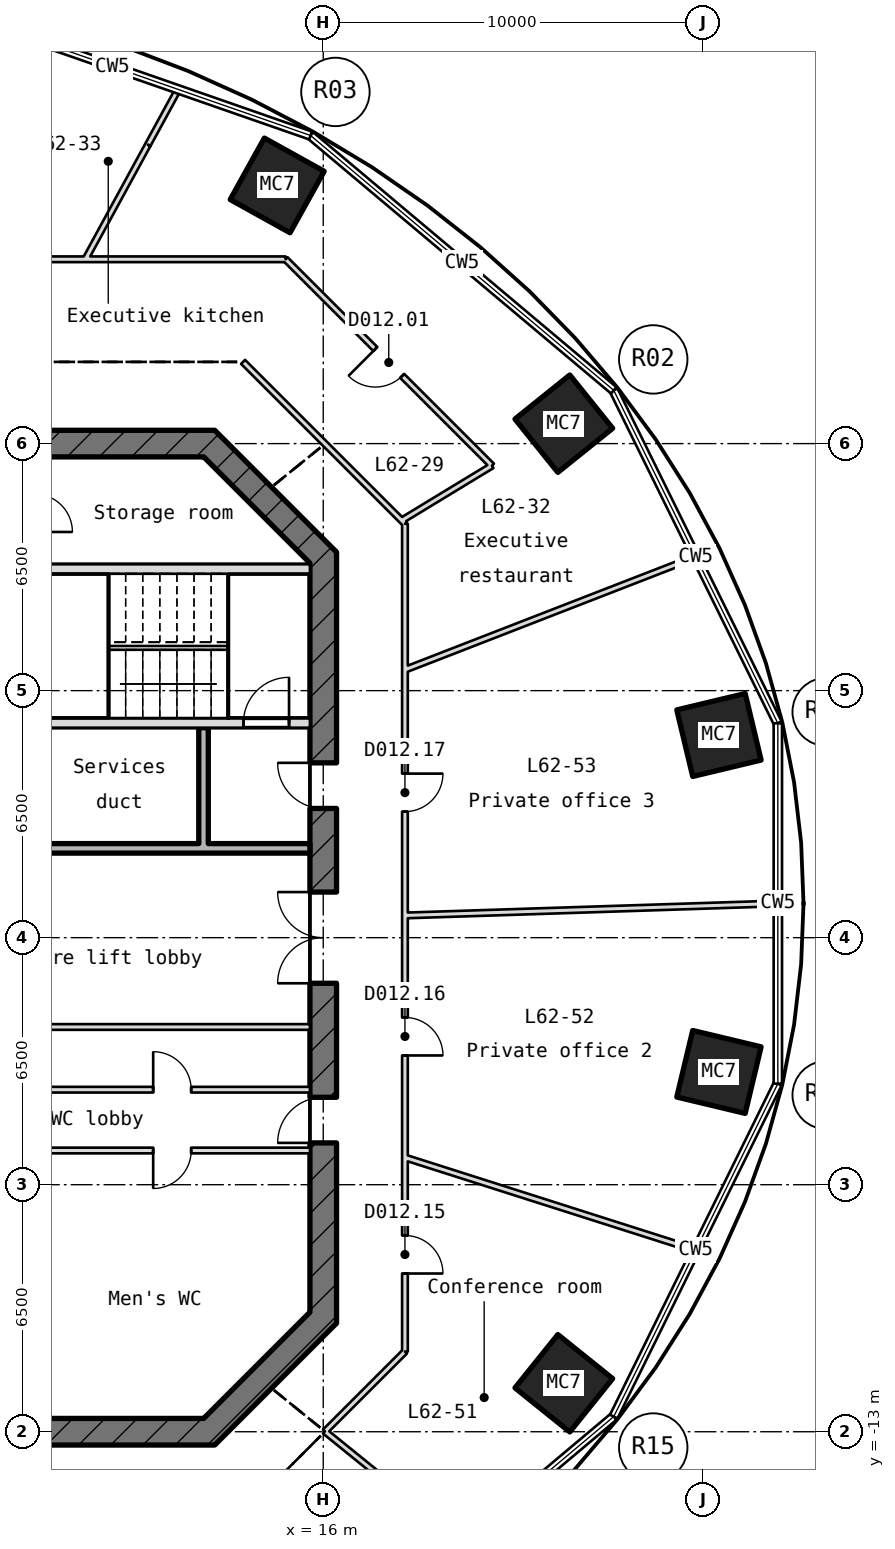
"""IFC4 building model, lengths in metres.
Left out: names, types, materials, properties, quantities, classifications, styles, units other than length and angle.
Written with IfcOpenShell. Run it as: python <this file> out.ifc"""

import sys

from ifc_helpers import new_model, si_unit, direction, frame, frame_2d, origin, origin_2d, place, context, subcontext, project, spatial, rectangle, hollow_rectangle, extrude, element, fill, save


model = new_model("IFC4")
c1 = context("Model", 3, precision=1e-05, world=origin(), true_north=direction((0.0, 1.0)))
c2 = subcontext(c1, "Body", "Model", "MODEL_VIEW")
j1 = project(units=[si_unit("LENGTHUNIT", "METRE"), si_unit("PLANEANGLEUNIT", "RADIAN")], contexts=[c1])
p1 = place(None, origin())
s1 = spatial("IfcSite", under=j1, at=p1, CompositionType="ELEMENT")
p2 = place(p1, origin())
s2 = spatial("IfcBuilding", under=s1, at=p2, CompositionType="ELEMENT")
p3 = place(p2, frame((0.0, 0.0, 279.1)))
s3 = spatial("IfcBuildingStorey", under=s2, at=p3, CompositionType="ELEMENT", Elevation=279.1)
for number, where, z_axis, x_axis in (
    (1, (26.413, 5.333, -0.25), (0.0, 0.0, 1.0), (0.233, -0.973, 0.0)),
    (2, (22.331, 13.524, -0.25), (0.0, 0.0, 1.0), (0.627, -0.779, 0.0)),
    (3, (14.788, 19.793, -0.25), (0.0, 0.0, 1.0), (0.874, -0.486, 0.0)),
    (4, (22.331, -11.724, -0.25), (0.0, 0.0, 1.0), (-0.627, -0.779, 0.0)),
    (5, (26.413, -3.533, -0.25), (0.0, 0.0, 1.0), (-0.233, -0.973, 0.0)),
):
    element("IfcColumn", number, at=place(p3, frame(where, z_axis=z_axis, x_axis=x_axis)), inside=s3, PredefinedType="COLUMN", context=c2, shape_type="SweptSolid", body=[
        extrude(hollow_rectangle(XDim=1.8, YDim=1.85, WallThickness=0.06, at=origin_2d()), origin(), (0.0, 0.0, 1.0), 5.47),
    ])
p4 = place(p3, frame((12.897, -13.103, -0.25), z_axis=(0.0, 0.0, 1.0), x_axis=(0.707106781187, 0.707106781187, 0.0)))
e6 = element("IfcWall", 6, at=p4, inside=s3, PredefinedType="SHEAR", context=c2, shape_type="SweptSolid", body=[
    extrude(rectangle(XDim=4.533, YDim=0.7, at=frame_2d((2.266, 0.0))), origin(), (0.0, 0.0, 1.0), 5.47),
])
p5 = place(p3, frame((16.0, -10.145, -0.25), z_axis=(0.0, 0.0, 1.0), x_axis=(0.0, 1.0, 0.0)))
e7 = element("IfcWall", 7, at=p5, inside=s3, PredefinedType="SHEAR", context=c2, shape_type="SweptSolid", body=[
    extrude(rectangle(XDim=20.29, YDim=0.7, at=frame_2d((10.145, 0.0))), origin(), (0.0, 0.0, 1.0), 5.47),
])
p6 = place(p5, frame((8.945, 0.0, 0.25)))
e8 = element("IfcOpeningElement", 8, at=p6, cuts=e7, PredefinedType="OPENING", context=c2, shape_type="SweptSolid", body=[
    extrude(rectangle(XDim=2.4, YDim=2.1, at=frame_2d((1.2, 1.05))), frame((0.0, 0.36, 0.0), z_axis=(0.0, -1.0, 0.0), x_axis=(1.0, 0.0, 0.0)), (0.0, 0.0, 1.0), 0.72),
])
p7 = place(p5, frame((13.545, 0.0, 0.25)))
e9 = element("IfcOpeningElement", 9, at=p7, cuts=e7, PredefinedType="OPENING", context=c2, shape_type="SweptSolid", body=[
    extrude(rectangle(XDim=1.2, YDim=2.1, at=frame_2d((0.6, 1.05))), frame((0.0, 0.36, 0.0), z_axis=(0.0, -1.0, 0.0), x_axis=(1.0, 0.0, 0.0)), (0.0, 0.0, 1.0), 0.72),
])
p8 = place(p5, frame((4.745, 0.0, 0.25)))
e10 = element("IfcOpeningElement", 10, at=p8, cuts=e7, PredefinedType="OPENING", context=c2, shape_type="SweptSolid", body=[
    extrude(rectangle(XDim=1.2, YDim=2.1, at=frame_2d((0.6, 1.05))), frame((0.0, 0.36, 0.0), z_axis=(0.0, -1.0, 0.0), x_axis=(1.0, 0.0, 0.0)), (0.0, 0.0, 1.0), 0.72),
])
p9 = place(p3, frame((16.103, 9.897, -0.25), z_axis=(0.0, 0.0, 1.0), x_axis=(-0.707106781187, 0.707106781187, 0.0)))
e11 = element("IfcWall", 11, at=p9, inside=s3, PredefinedType="SHEAR", context=c2, shape_type="SweptSolid", body=[
    extrude(rectangle(XDim=4.533, YDim=0.7, at=frame_2d((2.266, 0.0))), origin(), (0.0, 0.0, 1.0), 5.47),
])
p10 = place(p3, frame((13.145, 13.0, -0.25), z_axis=(0.0, 0.0, 1.0), x_axis=(-1.0, 0.0, 0.0)))
e12 = element("IfcWall", 12, at=p10, inside=s3, PredefinedType="SHEAR", context=c2, shape_type="SweptSolid", body=[
    extrude(rectangle(XDim=26.29, YDim=0.7, at=frame_2d((13.145, 0.0))), origin(), (0.0, 0.0, 1.0), 5.47),
])
p11 = place(p10, frame((11.945, 0.0, 0.25)))
e13 = element("IfcOpeningElement", 13, at=p11, cuts=e12, PredefinedType="OPENING", context=c2, shape_type="SweptSolid", body=[
    extrude(rectangle(XDim=2.4, YDim=2.1, at=frame_2d((1.2, 1.05))), frame((0.0, 0.36, 0.0), z_axis=(0.0, -1.0, 0.0), x_axis=(1.0, 0.0, 0.0)), (0.0, 0.0, 1.0), 0.72),
])
p12 = place(p3, frame((-13.145, -13.0, -0.25), z_axis=(0.0, 0.0, 1.0), x_axis=(1.0, 0.0, 0.0)))
e14 = element("IfcWall", 14, at=p12, inside=s3, PredefinedType="SHEAR", context=c2, shape_type="SweptSolid", body=[
    extrude(rectangle(XDim=26.29, YDim=0.7, at=frame_2d((13.145, 0.0))), origin(), (0.0, 0.0, 1.0), 5.47),
])
p13 = place(p12, frame((2.845, 0.0, 0.25)))
e15 = element("IfcOpeningElement", 15, at=p13, cuts=e14, PredefinedType="OPENING", context=c2, shape_type="SweptSolid", body=[
    extrude(rectangle(XDim=1.2, YDim=2.1, at=frame_2d((0.6, 1.05))), frame((0.0, 0.36, 0.0), z_axis=(0.0, -1.0, 0.0), x_axis=(1.0, 0.0, 0.0)), (0.0, 0.0, 1.0), 0.72),
])
p14 = place(p12, frame((6.845, 0.0, 0.25)))
e16 = element("IfcOpeningElement", 16, at=p14, cuts=e14, PredefinedType="OPENING", context=c2, shape_type="SweptSolid", body=[
    extrude(rectangle(XDim=1.4, YDim=2.1, at=frame_2d((0.7, 1.05))), frame((0.0, 0.36, 0.0), z_axis=(0.0, -1.0, 0.0), x_axis=(1.0, 0.0, 0.0)), (0.0, 0.0, 1.0), 0.72),
])
p15 = place(p12, frame((15.445, 0.0, 0.25)))
e17 = element("IfcOpeningElement", 17, at=p15, cuts=e14, PredefinedType="OPENING", context=c2, shape_type="SweptSolid", body=[
    extrude(rectangle(XDim=1.4, YDim=2.1, at=frame_2d((0.7, 1.05))), frame((0.0, 0.36, 0.0), z_axis=(0.0, -1.0, 0.0), x_axis=(1.0, 0.0, 0.0)), (0.0, 0.0, 1.0), 0.72),
])
p16 = place(p3, frame((8.55, -5.6, 0.0), z_axis=(0.0, 0.0, 1.0), x_axis=(1.0, 0.0, 0.0)))
e18 = element("IfcWall", 18, at=p16, inside=s3, PredefinedType="PARTITIONING", context=c2, shape_type="SweptSolid", body=[
    extrude(rectangle(XDim=7.1, YDim=0.15, at=frame_2d((3.55, 0.0))), origin(), (0.0, 0.0, 1.0), 5.22),
])
p17 = place(p16, frame((2.975, 0.0, 0.0)))
e19 = element("IfcOpeningElement", 19, at=p17, cuts=e18, PredefinedType="OPENING", context=c2, shape_type="SweptSolid", body=[
    extrude(rectangle(XDim=1.0, YDim=2.1, at=frame_2d((0.5, 1.05))), frame((0.0, 0.085, 0.0), z_axis=(0.0, -1.0, 0.0), x_axis=(1.0, 0.0, 0.0)), (0.0, 0.0, 1.0), 0.17),
])
p18 = place(p3, frame((8.55, -4.0, 0.0), z_axis=(0.0, 0.0, 1.0), x_axis=(1.0, 0.0, 0.0)))
e20 = element("IfcWall", 20, at=p18, inside=s3, PredefinedType="PARTITIONING", context=c2, shape_type="SweptSolid", body=[
    extrude(rectangle(XDim=7.1, YDim=0.15, at=frame_2d((3.55, 0.0))), origin(), (0.0, 0.0, 1.0), 5.22),
])
p19 = place(p18, frame((2.975, 0.0, 0.0)))
e21 = element("IfcOpeningElement", 21, at=p19, cuts=e20, PredefinedType="OPENING", context=c2, shape_type="SweptSolid", body=[
    extrude(rectangle(XDim=1.0, YDim=2.1, at=frame_2d((0.5, 1.05))), frame((0.0, 0.085, 0.0), z_axis=(0.0, -1.0, 0.0), x_axis=(1.0, 0.0, 0.0)), (0.0, 0.0, 1.0), 0.17),
])
p20 = place(p3, frame((8.4, -2.35, 0.0), z_axis=(0.0, 0.0, 1.0), x_axis=(1.0, 0.0, 0.0)))
e22 = element("IfcWall", 22, at=p20, inside=s3, PredefinedType="PARTITIONING", context=c2, shape_type="SweptSolid", body=[
    extrude(rectangle(XDim=7.25, YDim=0.15, at=frame_2d((3.625, 0.0))), origin(), (0.0, 0.0, 1.0), 5.22),
])
p21 = place(p3, frame((8.4, 2.35, 0.0), z_axis=(0.0, 0.0, 1.0), x_axis=(1.0, 0.0, 0.0)))
e23 = element("IfcWall", 23, at=p21, inside=s3, PredefinedType="STANDARD", context=c2, shape_type="SweptSolid", body=[
    extrude(rectangle(XDim=7.25, YDim=0.25, at=frame_2d((3.625, 0.0))), origin(), (0.0, 0.0, 1.0), 5.22),
])
p22 = place(p3, frame((8.55, 5.65, -0.25), z_axis=(0.0, 0.0, 1.0), x_axis=(1.0, 0.0, 0.0)))
e24 = element("IfcWall", 24, at=p22, inside=s3, PredefinedType="SHEAR", context=c2, shape_type="SweptSolid", body=[
    extrude(rectangle(XDim=7.1, YDim=0.25, at=frame_2d((3.55, 0.0))), origin(), (0.0, 0.0, 1.0), 5.47),
])
p23 = place(p22, frame((5.35, 0.0, 0.25)))
e25 = element("IfcOpeningElement", 25, at=p23, cuts=e24, PredefinedType="OPENING", context=c2, shape_type="SweptSolid", body=[
    extrude(rectangle(XDim=1.2, YDim=2.1, at=frame_2d((0.6, 1.05))), frame((0.0, 0.135, 0.0), z_axis=(0.0, -1.0, 0.0), x_axis=(1.0, 0.0, 0.0)), (0.0, 0.0, 1.0), 0.27),
])
p24 = place(p3, frame((8.55, 9.7, -0.25), z_axis=(0.0, 0.0, 1.0), x_axis=(1.0, 0.0, 0.0)))
e26 = element("IfcWall", 26, at=p24, inside=s3, PredefinedType="SHEAR", context=c2, shape_type="SweptSolid", body=[
    extrude(rectangle(XDim=7.1, YDim=0.25, at=frame_2d((3.55, 0.0))), origin(), (0.0, 0.0, 1.0), 5.47),
])
p25 = place(p3, frame((12.85, 2.475, 0.0), z_axis=(0.0, 0.0, 1.0), x_axis=(0.0, 1.0, 0.0)))
e27 = element("IfcWall", 27, at=p25, inside=s3, PredefinedType="STANDARD", context=c2, shape_type="SweptSolid", body=[
    extrude(rectangle(XDim=3.05, YDim=0.25, at=frame_2d((1.525, 0.0))), origin(), (0.0, 0.0, 1.0), 5.22),
])
p26 = place(p3, frame((-15.009, 17.85, 0.0), z_axis=(0.0, 0.0, 1.0), x_axis=(1.0, 0.0, 0.0)))
e28 = element("IfcWall", 28, at=p26, inside=s3, PredefinedType="PARTITIONING", context=c2, shape_type="SweptSolid", body=[
    extrude(rectangle(XDim=30.018, YDim=0.15, at=frame_2d((15.009, 0.0))), origin(), (0.0, 0.0, 1.0), 5.22),
])
p27 = place(p26, frame((21.282, 0.0, 0.0)))
e29 = element("IfcOpeningElement", 29, at=p27, cuts=e28, PredefinedType="OPENING", context=c2, shape_type="SweptSolid", body=[
    extrude(rectangle(XDim=1.0, YDim=2.1, at=frame_2d((0.5, 1.05))), frame((0.0, 0.085, 0.0), z_axis=(0.0, -1.0, 0.0), x_axis=(1.0, 0.0, 0.0)), (0.0, 0.0, 1.0), 0.17),
])
p28 = place(p26, frame((15.592, 0.0, 0.0)))
e30 = element("IfcOpeningElement", 30, at=p28, cuts=e28, PredefinedType="OPENING", context=c2, shape_type="SweptSolid", body=[
    extrude(rectangle(XDim=1.0, YDim=2.1, at=frame_2d((0.5, 1.05))), frame((0.0, 0.085, 0.0), z_axis=(0.0, -1.0, 0.0), x_axis=(1.0, 0.0, 0.0)), (0.0, 0.0, 1.0), 0.17),
])
p29 = place(p26, frame((10.075, 0.0, 0.0)))
e31 = element("IfcOpeningElement", 31, at=p29, cuts=e28, PredefinedType="OPENING", context=c2, shape_type="SweptSolid", body=[
    extrude(rectangle(XDim=1.0, YDim=2.1, at=frame_2d((0.5, 1.05))), frame((0.0, 0.085, 0.0), z_axis=(0.0, -1.0, 0.0), x_axis=(1.0, 0.0, 0.0)), (0.0, 0.0, 1.0), 0.17),
])
p30 = place(p26, frame((5.704, 0.0, 0.0)))
e32 = element("IfcOpeningElement", 32, at=p30, cuts=e28, PredefinedType="OPENING", context=c2, shape_type="SweptSolid", body=[
    extrude(rectangle(XDim=1.0, YDim=2.1, at=frame_2d((0.5, 1.05))), frame((0.0, 0.085, 0.0), z_axis=(0.0, -1.0, 0.0), x_axis=(1.0, 0.0, 0.0)), (0.0, 0.0, 1.0), 0.17),
])
p31 = place(p26, frame((1.814, 0.0, 0.0)))
e33 = element("IfcOpeningElement", 33, at=p31, cuts=e28, PredefinedType="OPENING", context=c2, shape_type="SweptSolid", body=[
    extrude(rectangle(XDim=1.0, YDim=2.1, at=frame_2d((0.5, 1.05))), frame((0.0, 0.085, 0.0), z_axis=(0.0, -1.0, 0.0), x_axis=(1.0, 0.0, 0.0)), (0.0, 0.0, 1.0), 0.17),
])
p32 = place(p3, frame((18.15, 0.584, 0.0), z_axis=(0.0, 0.0, 1.0), x_axis=(0.999482417138, 0.032169827986, 0.0)))
e34 = element("IfcWall", 34, at=p32, inside=s3, PredefinedType="PARTITIONING", context=c2, shape_type="SweptSolid", body=[
    extrude(rectangle(XDim=9.798, YDim=0.15, at=frame_2d((4.899, 0.0))), origin(), (0.0, 0.0, 1.0), 5.22),
])
p33 = place(p3, frame((18.15, 7.049, 0.0), z_axis=(0.0, 0.0, 1.0), x_axis=(0.932169041373, 0.362023311828, 0.0)))
e35 = element("IfcWall", 35, at=p33, inside=s3, PredefinedType="PARTITIONING", context=c2, shape_type="SweptSolid", body=[
    extrude(rectangle(XDim=8.19, YDim=0.15, at=frame_2d((4.095, 0.0))), origin(), (0.0, 0.0, 1.0), 5.22),
])
p34 = place(p3, frame((18.064, 10.976, 0.0), z_axis=(0.0, 0.0, 1.0), x_axis=(0.854588442766, 0.519305876619, 0.0)))
e36 = element("IfcWall", 36, at=p34, inside=s3, PredefinedType="PARTITIONING", context=c2, shape_type="SweptSolid", body=[
    extrude(rectangle(XDim=2.779, YDim=0.15, at=frame_2d((1.39, 0.0))), origin(), (0.0, 0.0, 1.0), 4.867),
])
p35 = place(p3, frame((16.046, -12.994, 0.0), z_axis=(0.0, 0.0, 1.0), x_axis=(0.707106781187, 0.707106781187, 0.0)))
e37 = element("IfcWall", 37, at=p35, inside=s3, PredefinedType="PARTITIONING", context=c2, shape_type="SweptSolid", body=[
    extrude(rectangle(XDim=2.975, YDim=0.15, at=frame_2d((1.487, 0.0))), origin(), (0.0, 0.0, 1.0), 5.22),
])
p36 = place(p3, frame((9.742, 17.85, 0.0), z_axis=(0.0, 0.0, 1.0), x_axis=(0.479051311854, 0.877786899316, 0.0)))
e38 = element("IfcWall", 38, at=p36, inside=s3, PredefinedType="PARTITIONING", context=c2, shape_type="SweptSolid", body=[
    extrude(rectangle(XDim=3.435, YDim=0.15, at=frame_2d((1.717, 0.0))), origin(), (0.0, 0.0, 1.0), 4.803),
])
p37 = place(p3, frame((11.388, 20.865, 0.0), z_axis=(0.0, 0.0, 1.0), x_axis=(0.479134206063, 0.877741654805, 0.0)))
e39 = element("IfcWall", 39, at=p37, inside=s3, PredefinedType="PARTITIONING", context=c2, shape_type="SweptSolid", body=[
    extrude(rectangle(XDim=1.637, YDim=0.15, at=frame_2d((0.819, 0.0))), origin(), (0.0, 0.0, 1.0), 5.22),
])
p38 = place(p3, frame((18.15, -10.891, 0.0), z_axis=(0.0, 0.0, 1.0), x_axis=(0.0, 1.0, 0.0)))
e40 = element("IfcWall", 40, at=p38, inside=s3, PredefinedType="PARTITIONING", context=c2, shape_type="SweptSolid", body=[
    extrude(rectangle(XDim=21.781, YDim=0.15, at=frame_2d((10.891, 0.0))), origin(), (0.0, 0.0, 1.0), 5.22),
])
p39 = place(p38, frame((2.054, 0.0, 0.0)))
e41 = element("IfcOpeningElement", 41, at=p39, cuts=e40, PredefinedType="OPENING", context=c2, shape_type="SweptSolid", body=[
    extrude(rectangle(XDim=1.0, YDim=2.1, at=frame_2d((0.5, 1.05))), frame((0.0, 0.085, 0.0), z_axis=(0.0, -1.0, 0.0), x_axis=(1.0, 0.0, 0.0)), (0.0, 0.0, 1.0), 0.17),
])
p40 = place(p38, frame((7.791, 0.0, 0.0)))
e42 = element("IfcOpeningElement", 42, at=p40, cuts=e40, PredefinedType="OPENING", context=c2, shape_type="SweptSolid", body=[
    extrude(rectangle(XDim=1.0, YDim=2.1, at=frame_2d((0.5, 1.05))), frame((0.0, 0.085, 0.0), z_axis=(0.0, -1.0, 0.0), x_axis=(1.0, 0.0, 0.0)), (0.0, 0.0, 1.0), 0.17),
])
p41 = place(p38, frame((14.207, 0.0, 0.0)))
e43 = element("IfcOpeningElement", 43, at=p41, cuts=e40, PredefinedType="OPENING", context=c2, shape_type="SweptSolid", body=[
    extrude(rectangle(XDim=1.0, YDim=2.1, at=frame_2d((0.5, 1.05))), frame((0.0, 0.085, 0.0), z_axis=(0.0, -1.0, 0.0), x_axis=(1.0, 0.0, 0.0)), (0.0, 0.0, 1.0), 0.17),
])
p42 = place(p3, frame((20.439, 12.42, 0.0), z_axis=(0.0, 0.0, 1.0), x_axis=(-0.707106781187, 0.707106781187, 0.0)))
e44 = element("IfcWall", 44, at=p42, inside=s3, PredefinedType="PARTITIONING", context=c2, shape_type="SweptSolid", body=[
    extrude(rectangle(XDim=7.68, YDim=0.15, at=frame_2d((3.84, 0.0))), origin(), (0.0, 0.0, 1.0), 5.22),
])
p43 = place(p42, frame((3.34, 0.0, 0.0)))
e45 = element("IfcOpeningElement", 45, at=p43, cuts=e44, PredefinedType="OPENING", context=c2, shape_type="SweptSolid", body=[
    extrude(rectangle(XDim=1.0, YDim=2.1, at=frame_2d((0.5, 1.05))), frame((0.0, 0.085, 0.0), z_axis=(0.0, -1.0, 0.0), x_axis=(1.0, 0.0, 0.0)), (0.0, 0.0, 1.0), 0.17),
])
p44 = place(p3, frame((18.15, 10.891, 0.0), z_axis=(0.0, 0.0, 1.0), x_axis=(-0.707106781187, 0.707106781187, 0.0)))
e46 = element("IfcWall", 46, at=p44, inside=s3, PredefinedType="PARTITIONING", context=c2, shape_type="SweptSolid", body=[
    extrude(rectangle(XDim=6.023, YDim=0.15, at=frame_2d((3.012, 0.0))), origin(), (0.0, 0.0, 1.0), 5.22),
])
p45 = place(p3, frame((19.658, -15.919, 0.0), z_axis=(0.0, 0.0, 1.0), x_axis=(-0.777148316215, 0.629317483155, 0.0)))
e47 = element("IfcWall", 47, at=p45, inside=s3, PredefinedType="PARTITIONING", context=c2, shape_type="SweptSolid", body=[
    extrude(rectangle(XDim=4.652, YDim=0.15, at=frame_2d((2.326, 0.0))), origin(), (0.0, 0.0, 1.0), 5.22),
])
p46 = place(p3, frame((25.784, -8.216, 0.0), z_axis=(0.0, 0.0, 1.0), x_axis=(-0.952807256027, 0.303575909555, 0.0)))
e48 = element("IfcWall", 48, at=p46, inside=s3, PredefinedType="PARTITIONING", context=c2, shape_type="SweptSolid", body=[
    extrude(rectangle(XDim=8.012, YDim=0.15, at=frame_2d((4.006, 0.0))), origin(), (0.0, 0.0, 1.0), 5.22),
])
p47 = place(p23, origin())
e49 = element("IfcDoor", 49, at=p47, inside=s3, OperationType="SINGLE_SWING_RIGHT", PredefinedType="DOOR", context=c2, shape_type="SweptSolid", body=[
    extrude(rectangle(XDim=1.2, YDim=2.1, at=frame_2d((0.6, 1.05))), frame((0.0, 0.025, 0.0), z_axis=(0.0, -1.0, 0.0), x_axis=(1.0, 0.0, 0.0)), (0.0, 0.0, 1.0), 0.05),
])
fill(e25, e49)
p48 = place(p6, origin())
e50 = element("IfcDoor", 50, at=p48, inside=s3, OperationType="DOUBLE_DOOR_SINGLE_SWING", PredefinedType="DOOR", context=c2, shape_type="SweptSolid", body=[
    extrude(rectangle(XDim=2.4, YDim=2.1, at=frame_2d((1.2, 1.05))), frame((0.0, 0.025, 0.0), z_axis=(0.0, -1.0, 0.0), x_axis=(1.0, 0.0, 0.0)), (0.0, 0.0, 1.0), 0.05),
])
fill(e8, e50)
p49 = place(p7, origin())
e51 = element("IfcDoor", 51, at=p49, inside=s3, OperationType="SINGLE_SWING_RIGHT", PredefinedType="DOOR", context=c2, shape_type="SweptSolid", body=[
    extrude(rectangle(XDim=1.2, YDim=2.1, at=frame_2d((0.6, 1.05))), frame((0.0, 0.025, 0.0), z_axis=(0.0, -1.0, 0.0), x_axis=(1.0, 0.0, 0.0)), (0.0, 0.0, 1.0), 0.05),
])
fill(e9, e51)
p50 = place(p19, origin())
e52 = element("IfcDoor", 52, at=p50, inside=s3, OperationType="SINGLE_SWING_RIGHT", PredefinedType="DOOR", context=c2, shape_type="SweptSolid", body=[
    extrude(rectangle(XDim=1.0, YDim=2.1, at=frame_2d((0.5, 1.05))), frame((0.0, 0.025, 0.0), z_axis=(0.0, -1.0, 0.0), x_axis=(1.0, 0.0, 0.0)), (0.0, 0.0, 1.0), 0.05),
])
fill(e21, e52)
p51 = place(p8, origin())
e53 = element("IfcDoor", 53, at=p51, inside=s3, OperationType="SINGLE_SWING_RIGHT", PredefinedType="DOOR", context=c2, shape_type="SweptSolid", body=[
    extrude(rectangle(XDim=1.2, YDim=2.1, at=frame_2d((0.6, 1.05))), frame((0.0, 0.025, 0.0), z_axis=(0.0, -1.0, 0.0), x_axis=(1.0, 0.0, 0.0)), (0.0, 0.0, 1.0), 0.05),
])
fill(e10, e53)
p52 = place(p17, frame((1.0, 0.0, 0.0), z_axis=(0.0, 0.0, 1.0), x_axis=(-1.0, 0.0, 0.0)))
e54 = element("IfcDoor", 54, at=p52, inside=s3, OperationType="SINGLE_SWING_LEFT", PredefinedType="DOOR", context=c2, shape_type="SweptSolid", body=[
    extrude(rectangle(XDim=1.0, YDim=2.1, at=frame_2d((0.5, 1.05))), frame((0.0, 0.025, 0.0), z_axis=(0.0, -1.0, 0.0), x_axis=(1.0, 0.0, 0.0)), (0.0, 0.0, 1.0), 0.05),
])
fill(e19, e54)
p53 = place(p43, origin())
e55 = element("IfcDoor", 55, at=p53, inside=s3, OperationType="SINGLE_SWING_RIGHT", PredefinedType="DOOR", context=c2, shape_type="SweptSolid", body=[
    extrude(rectangle(XDim=1.0, YDim=2.1, at=frame_2d((0.5, 1.05))), frame((0.0, 0.025, 0.0), z_axis=(0.0, -1.0, 0.0), x_axis=(1.0, 0.0, 0.0)), (0.0, 0.0, 1.0), 0.05),
])
fill(e45, e55)
p54 = place(p39, frame((1.0, 0.0, 0.0), z_axis=(0.0, 0.0, 1.0), x_axis=(-1.0, 0.0, 0.0)))
e56 = element("IfcDoor", 56, at=p54, inside=s3, OperationType="SINGLE_SWING_LEFT", PredefinedType="DOOR", context=c2, shape_type="SweptSolid", body=[
    extrude(rectangle(XDim=1.0, YDim=2.1, at=frame_2d((0.5, 1.05))), frame((0.0, 0.025, 0.0), z_axis=(0.0, -1.0, 0.0), x_axis=(1.0, 0.0, 0.0)), (0.0, 0.0, 1.0), 0.05),
])
fill(e41, e56)
p55 = place(p40, frame((1.0, 0.0, 0.0), z_axis=(0.0, 0.0, 1.0), x_axis=(-1.0, 0.0, 0.0)))
e57 = element("IfcDoor", 57, at=p55, inside=s3, OperationType="SINGLE_SWING_LEFT", PredefinedType="DOOR", context=c2, shape_type="SweptSolid", body=[
    extrude(rectangle(XDim=1.0, YDim=2.1, at=frame_2d((0.5, 1.05))), frame((0.0, 0.025, 0.0), z_axis=(0.0, -1.0, 0.0), x_axis=(1.0, 0.0, 0.0)), (0.0, 0.0, 1.0), 0.05),
])
fill(e42, e57)
p56 = place(p41, frame((1.0, 0.0, 0.0), z_axis=(0.0, 0.0, 1.0), x_axis=(-1.0, 0.0, 0.0)))
e58 = element("IfcDoor", 58, at=p56, inside=s3, OperationType="SINGLE_SWING_LEFT", PredefinedType="DOOR", context=c2, shape_type="SweptSolid", body=[
    extrude(rectangle(XDim=1.0, YDim=2.1, at=frame_2d((0.5, 1.05))), frame((0.0, 0.025, 0.0), z_axis=(0.0, -1.0, 0.0), x_axis=(1.0, 0.0, 0.0)), (0.0, 0.0, 1.0), 0.05),
])
fill(e43, e58)
save(model, sys.argv[1])
